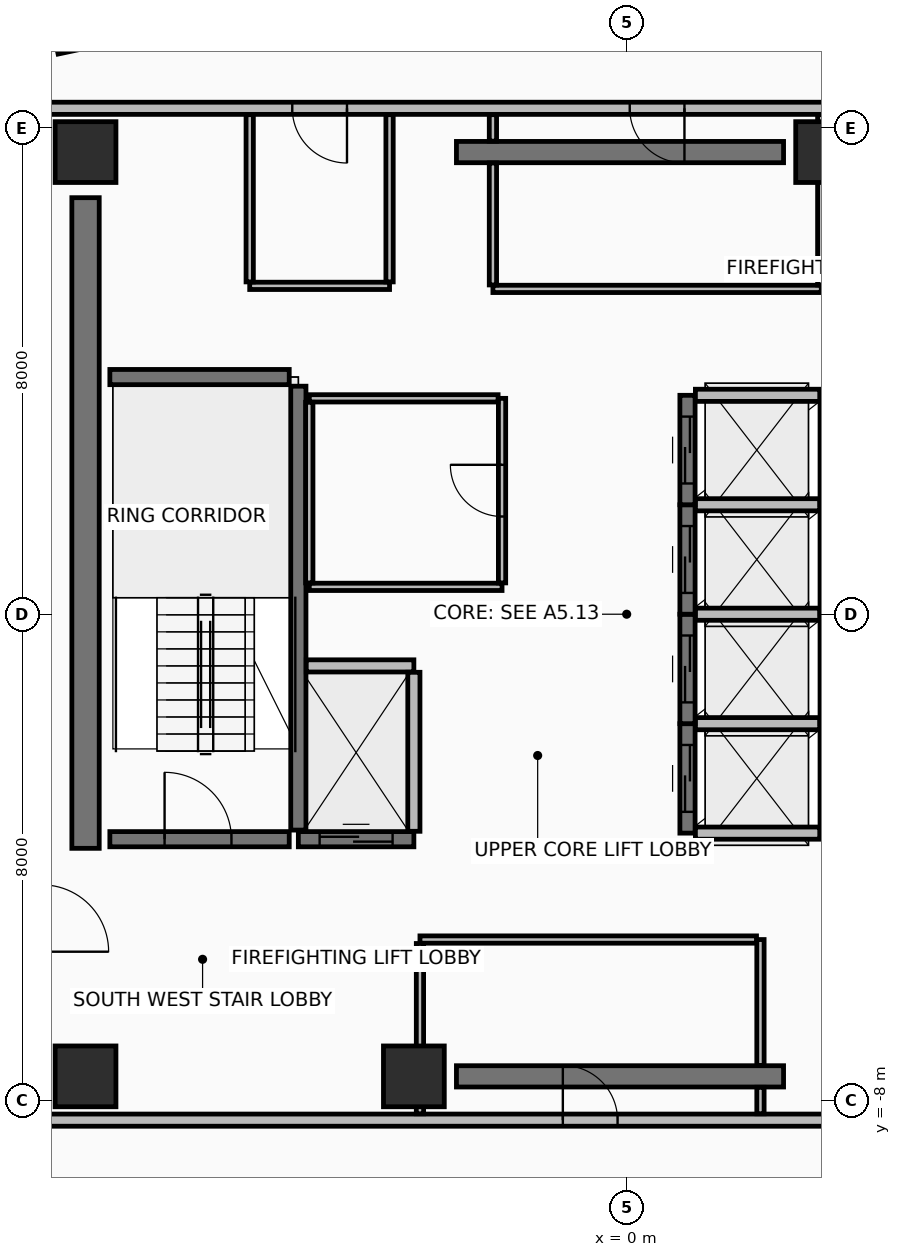
"""IFC4 building model, lengths in metres.
Left out: names, types, materials, properties, quantities, classifications, styles, units other than length and angle.
Written with IfcOpenShell. Run it as: python <this file> out.ifc"""

import sys

from ifc_helpers import new_model, si_unit, direction, frame, frame_2d, origin, origin_2d, place, context, subcontext, project, spatial, rectangle, hollow_rectangle, extrude, element, fill, save


model = new_model("IFC4")
c1 = context("Model", 3, precision=1e-05, world=origin(), true_north=direction((0.0, 1.0)))
c2 = subcontext(c1, "Body", "Model", "MODEL_VIEW")
j1 = project(units=[si_unit("LENGTHUNIT", "METRE"), si_unit("PLANEANGLEUNIT", "RADIAN")], contexts=[c1])
p1 = place(None, origin())
s1 = spatial("IfcSite", under=j1, at=p1, CompositionType="ELEMENT")
p2 = place(p1, origin())
s2 = spatial("IfcBuilding", under=s1, at=p2, CompositionType="ELEMENT")
p3 = place(p2, frame((0.0, 0.0, 290.7)))
s3 = spatial("IfcBuildingStorey", under=s2, at=p3, CompositionType="ELEMENT", Elevation=290.7)
for number, where, z_axis, x_axis in (
    (1, (-8.9, -7.6, 0.0), (0.0, 0.0, 1.0), (1.0, 0.0, 0.0)),
    (2, (-3.5, -7.6, 0.0), (0.0, 0.0, 1.0), (1.0, 0.0, 0.0)),
    (3, (3.28, 7.6, 0.0), (0.0, 0.0, 1.0), (1.0, 0.0, 0.0)),
    (4, (-8.9, 7.6, 0.0), (0.0, 0.0, 1.0), (1.0, 0.0, 0.0)),
):
    element("IfcColumn", number, at=place(p3, frame(where, z_axis=z_axis, x_axis=x_axis)), inside=s3, PredefinedType="COLUMN", context=c2, shape_type="SweptSolid", body=[
        extrude(rectangle(XDim=1.0, YDim=1.0, at=origin_2d()), origin(), (0.0, 0.0, 1.0), 3.65),
    ])
p4 = place(p3, frame((-9.197, 9.449, 0.0), z_axis=(0.0, 0.0, 1.0), x_axis=(0.978147237858, 0.207913398007, 0.0)))
e5 = element("IfcColumn", 5, at=p4, inside=s3, PredefinedType="COLUMN", context=c2, shape_type="SweptSolid", body=[
    extrude(hollow_rectangle(XDim=0.4, YDim=0.4, WallThickness=0.025, at=origin_2d()), origin(), (0.0, 0.0, 1.0), 3.65),
])
for number, where, z_axis, x_axis in (
    (6, (-2.8, -7.6, 0.0), (0.0, 0.0, 1.0), (1.0, 0.0, 0.0)),
    (7, (-2.8, 7.6, 0.0), (0.0, 0.0, 1.0), (1.0, 0.0, 0.0)),
):
    element("IfcWall", number, at=place(p3, frame(where, z_axis=z_axis, x_axis=x_axis)), inside=s3, PredefinedType="SHEAR", context=c2, shape_type="SweptSolid", body=[
        extrude(rectangle(XDim=5.38, YDim=0.35, at=frame_2d((2.69, 0.0))), origin(), (0.0, 0.0, 1.0), 3.465),
    ])
p5 = place(p3, frame((-8.9, -3.85, 0.0), z_axis=(0.0, 0.0, 1.0), x_axis=(0.0, 1.0, 0.0)))
e8 = element("IfcWall", 8, at=p5, inside=s3, PredefinedType="SHEAR", context=c2, shape_type="SweptSolid", body=[
    extrude(rectangle(XDim=10.7, YDim=0.45, at=frame_2d((5.35, 0.0))), origin(), (0.0, 0.0, 1.0), 3.465),
])
p6 = place(p3, frame((-9.62, -8.32, 0.0), z_axis=(0.0, 0.0, 1.0), x_axis=(1.0, 0.0, 0.0)))
e9 = element("IfcWall", 9, at=p6, inside=s3, PredefinedType="PARTITIONING", context=c2, shape_type="SweptSolid", body=[
    extrude(rectangle(XDim=19.24, YDim=0.2, at=frame_2d((9.62, 0.0))), origin(), (0.0, 0.0, 1.0), 2.96),
])
p7 = place(p6, frame((8.57, 0.0, 0.0)))
e10 = element("IfcOpeningElement", 10, at=p7, cuts=e9, PredefinedType="OPENING", context=c2, shape_type="SweptSolid", body=[
    extrude(rectangle(XDim=0.9, YDim=2.1, at=frame_2d((0.45, 1.05))), frame((0.0, 0.11, 0.0), z_axis=(0.0, -1.0, 0.0), x_axis=(1.0, 0.0, 0.0)), (0.0, 0.0, 1.0), 0.22),
])
p8 = place(p6, frame((15.02, 0.0, 0.0)))
e11 = element("IfcOpeningElement", 11, at=p8, cuts=e9, PredefinedType="OPENING", context=c2, shape_type="SweptSolid", body=[
    extrude(rectangle(XDim=0.9, YDim=2.1, at=frame_2d((0.45, 1.05))), frame((0.0, 0.11, 0.0), z_axis=(0.0, -1.0, 0.0), x_axis=(1.0, 0.0, 0.0)), (0.0, 0.0, 1.0), 0.22),
])
p9 = place(p3, frame((9.62, 8.32, 0.0), z_axis=(0.0, 0.0, 1.0), x_axis=(-1.0, 0.0, 0.0)))
e12 = element("IfcWall", 12, at=p9, inside=s3, PredefinedType="PARTITIONING", context=c2, shape_type="SweptSolid", body=[
    extrude(rectangle(XDim=19.24, YDim=0.2, at=frame_2d((9.62, 0.0))), origin(), (0.0, 0.0, 1.0), 2.96),
])
p10 = place(p9, frame((8.67, 0.0, 0.0)))
e13 = element("IfcOpeningElement", 13, at=p10, cuts=e12, PredefinedType="OPENING", context=c2, shape_type="SweptSolid", body=[
    extrude(rectangle(XDim=0.9, YDim=2.1, at=frame_2d((0.45, 1.05))), frame((0.0, 0.11, 0.0), z_axis=(0.0, -1.0, 0.0), x_axis=(1.0, 0.0, 0.0)), (0.0, 0.0, 1.0), 0.22),
])
p11 = place(p9, frame((14.22, 0.0, 0.0)))
e14 = element("IfcOpeningElement", 14, at=p11, cuts=e12, PredefinedType="OPENING", context=c2, shape_type="SweptSolid", body=[
    extrude(rectangle(XDim=0.9, YDim=2.1, at=frame_2d((0.45, 1.05))), frame((0.0, 0.11, 0.0), z_axis=(0.0, -1.0, 0.0), x_axis=(1.0, 0.0, 0.0)), (0.0, 0.0, 1.0), 0.22),
])
p12 = place(p3, frame((-5.4, -3.55, 0.0), z_axis=(0.0, 0.0, 1.0), x_axis=(0.0, 1.0, 0.0)))
e15 = element("IfcWall", 15, at=p12, inside=s3, PredefinedType="SHEAR", context=c2, shape_type="SweptSolid", body=[
    extrude(rectangle(XDim=7.3, YDim=0.25, at=frame_2d((3.65, 0.0))), origin(), (0.0, 0.0, 1.0), 3.465),
])
p13 = place(p3, frame((-8.5, -3.7, 0.0), z_axis=(0.0, 0.0, 1.0), x_axis=(1.0, 0.0, 0.0)))
e16 = element("IfcWall", 16, at=p13, inside=s3, PredefinedType="SHEAR", context=c2, shape_type="SweptSolid", body=[
    extrude(rectangle(XDim=2.95, YDim=0.25, at=frame_2d((1.475, 0.0))), origin(), (0.0, 0.0, 1.0), 3.465),
])
p14 = place(p13, frame((0.9, 0.0, 0.0)))
e17 = element("IfcOpeningElement", 17, at=p14, cuts=e16, PredefinedType="OPENING", context=c2, shape_type="SweptSolid", body=[
    extrude(rectangle(XDim=1.1, YDim=2.15, at=frame_2d((0.55, 1.075))), frame((0.0, 0.135, 0.0), z_axis=(0.0, -1.0, 0.0), x_axis=(1.0, 0.0, 0.0)), (0.0, 0.0, 1.0), 0.27),
])
p15 = place(p3, frame((-8.5, 3.9, 0.0), z_axis=(0.0, 0.0, 1.0), x_axis=(1.0, 0.0, 0.0)))
e18 = element("IfcWall", 18, at=p15, inside=s3, PredefinedType="SHEAR", context=c2, shape_type="SweptSolid", body=[
    extrude(rectangle(XDim=2.95, YDim=0.25, at=frame_2d((1.475, 0.0))), origin(), (0.0, 0.0, 1.0), 3.465),
])
p16 = place(p3, frame((1.0, -3.6, 0.0), z_axis=(0.0, 0.0, 1.0), x_axis=(0.0, 1.0, 0.0)))
e19 = element("IfcWall", 19, at=p16, inside=s3, PredefinedType="SHEAR", context=c2, shape_type="SweptSolid", body=[
    extrude(rectangle(XDim=1.8, YDim=0.25, at=frame_2d((0.9, 0.0))), origin(), (0.0, 0.0, 1.0), 3.465),
])
p17 = place(p16, frame((0.35, 0.0, 0.0)))
e20 = element("IfcOpeningElement", 20, at=p17, cuts=e19, PredefinedType="OPENING", context=c2, shape_type="SweptSolid", body=[
    extrude(rectangle(XDim=1.1, YDim=2.2, at=frame_2d((0.55, 1.1))), frame((0.0, 0.135, 0.0), z_axis=(0.0, -1.0, 0.0), x_axis=(1.0, 0.0, 0.0)), (0.0, 0.0, 1.0), 0.27),
])
p18 = place(p3, frame((3.28, -3.6, 0.0), z_axis=(0.0, 0.0, 1.0), x_axis=(0.0, 1.0, 0.0)))
e21 = element("IfcWall", 21, at=p18, inside=s3, PredefinedType="PARTITIONING", context=c2, shape_type="SweptSolid", body=[
    extrude(rectangle(XDim=1.8, YDim=0.2, at=frame_2d((0.9, 0.0))), origin(), (0.0, 0.0, 1.0), 3.465),
])
for number, where, z_axis, x_axis in (
    (22, (1.13, -3.6, 0.0), (0.0, 0.0, 1.0), (1.0, 0.0, 0.0)),
    (23, (1.13, -1.8, 0.0), (0.0, 0.0, 1.0), (1.0, 0.0, 0.0)),
):
    element("IfcWall", number, at=place(p3, frame(where, z_axis=z_axis, x_axis=x_axis)), inside=s3, PredefinedType="PARTITIONING", context=c2, shape_type="SweptSolid", body=[
        extrude(rectangle(XDim=2.045, YDim=0.2, at=frame_2d((1.022, 0.0))), origin(), (0.0, 0.0, 1.0), 3.465),
    ])
p19 = place(p3, frame((1.0, -1.8, 0.0), z_axis=(0.0, 0.0, 1.0), x_axis=(0.0, 1.0, 0.0)))
e24 = element("IfcWall", 24, at=p19, inside=s3, PredefinedType="SHEAR", context=c2, shape_type="SweptSolid", body=[
    extrude(rectangle(XDim=1.8, YDim=0.25, at=frame_2d((0.9, 0.0))), origin(), (0.0, 0.0, 1.0), 3.465),
])
p20 = place(p19, frame((0.35, 0.0, 0.0)))
e25 = element("IfcOpeningElement", 25, at=p20, cuts=e24, PredefinedType="OPENING", context=c2, shape_type="SweptSolid", body=[
    extrude(rectangle(XDim=1.1, YDim=2.2, at=frame_2d((0.55, 1.1))), frame((0.0, 0.135, 0.0), z_axis=(0.0, -1.0, 0.0), x_axis=(1.0, 0.0, 0.0)), (0.0, 0.0, 1.0), 0.27),
])
p21 = place(p3, frame((3.28, -1.8, 0.0), z_axis=(0.0, 0.0, 1.0), x_axis=(0.0, 1.0, 0.0)))
e26 = element("IfcWall", 26, at=p21, inside=s3, PredefinedType="PARTITIONING", context=c2, shape_type="SweptSolid", body=[
    extrude(rectangle(XDim=1.8, YDim=0.2, at=frame_2d((0.9, 0.0))), origin(), (0.0, 0.0, 1.0), 3.465),
])
p22 = place(p3, frame((1.13, 0.0, 0.0), z_axis=(0.0, 0.0, 1.0), x_axis=(1.0, 0.0, 0.0)))
e27 = element("IfcWall", 27, at=p22, inside=s3, PredefinedType="PARTITIONING", context=c2, shape_type="SweptSolid", body=[
    extrude(rectangle(XDim=2.045, YDim=0.2, at=frame_2d((1.022, 0.0))), origin(), (0.0, 0.0, 1.0), 3.465),
])
p23 = place(p3, frame((1.0, 0.0, 0.0), z_axis=(0.0, 0.0, 1.0), x_axis=(0.0, 1.0, 0.0)))
e28 = element("IfcWall", 28, at=p23, inside=s3, PredefinedType="SHEAR", context=c2, shape_type="SweptSolid", body=[
    extrude(rectangle(XDim=1.8, YDim=0.25, at=frame_2d((0.9, 0.0))), origin(), (0.0, 0.0, 1.0), 3.465),
])
p24 = place(p23, frame((0.35, 0.0, 0.0)))
e29 = element("IfcOpeningElement", 29, at=p24, cuts=e28, PredefinedType="OPENING", context=c2, shape_type="SweptSolid", body=[
    extrude(rectangle(XDim=1.1, YDim=2.2, at=frame_2d((0.55, 1.1))), frame((0.0, 0.135, 0.0), z_axis=(0.0, -1.0, 0.0), x_axis=(1.0, 0.0, 0.0)), (0.0, 0.0, 1.0), 0.27),
])
p25 = place(p3, frame((3.28, 0.0, 0.0), z_axis=(0.0, 0.0, 1.0), x_axis=(0.0, 1.0, 0.0)))
e30 = element("IfcWall", 30, at=p25, inside=s3, PredefinedType="PARTITIONING", context=c2, shape_type="SweptSolid", body=[
    extrude(rectangle(XDim=1.8, YDim=0.2, at=frame_2d((0.9, 0.0))), origin(), (0.0, 0.0, 1.0), 3.465),
])
p26 = place(p3, frame((1.13, 1.8, 0.0), z_axis=(0.0, 0.0, 1.0), x_axis=(1.0, 0.0, 0.0)))
e31 = element("IfcWall", 31, at=p26, inside=s3, PredefinedType="PARTITIONING", context=c2, shape_type="SweptSolid", body=[
    extrude(rectangle(XDim=2.045, YDim=0.2, at=frame_2d((1.022, 0.0))), origin(), (0.0, 0.0, 1.0), 3.465),
])
p27 = place(p3, frame((1.0, 1.8, 0.0), z_axis=(0.0, 0.0, 1.0), x_axis=(0.0, 1.0, 0.0)))
e32 = element("IfcWall", 32, at=p27, inside=s3, PredefinedType="SHEAR", context=c2, shape_type="SweptSolid", body=[
    extrude(rectangle(XDim=1.8, YDim=0.25, at=frame_2d((0.9, 0.0))), origin(), (0.0, 0.0, 1.0), 3.465),
])
p28 = place(p27, frame((0.35, 0.0, 0.0)))
e33 = element("IfcOpeningElement", 33, at=p28, cuts=e32, PredefinedType="OPENING", context=c2, shape_type="SweptSolid", body=[
    extrude(rectangle(XDim=1.1, YDim=2.2, at=frame_2d((0.55, 1.1))), frame((0.0, 0.135, 0.0), z_axis=(0.0, -1.0, 0.0), x_axis=(1.0, 0.0, 0.0)), (0.0, 0.0, 1.0), 0.27),
])
p29 = place(p3, frame((3.28, 1.8, 0.0), z_axis=(0.0, 0.0, 1.0), x_axis=(0.0, 1.0, 0.0)))
e34 = element("IfcWall", 34, at=p29, inside=s3, PredefinedType="PARTITIONING", context=c2, shape_type="SweptSolid", body=[
    extrude(rectangle(XDim=1.8, YDim=0.2, at=frame_2d((0.9, 0.0))), origin(), (0.0, 0.0, 1.0), 3.465),
])
p30 = place(p3, frame((1.13, 3.6, 0.0), z_axis=(0.0, 0.0, 1.0), x_axis=(1.0, 0.0, 0.0)))
e35 = element("IfcWall", 35, at=p30, inside=s3, PredefinedType="PARTITIONING", context=c2, shape_type="SweptSolid", body=[
    extrude(rectangle(XDim=2.045, YDim=0.2, at=frame_2d((1.022, 0.0))), origin(), (0.0, 0.0, 1.0), 2.76),
])
p31 = place(p3, frame((-5.4, -3.7, 0.0), z_axis=(0.0, 0.0, 1.0), x_axis=(1.0, 0.0, 0.0)))
e36 = element("IfcWall", 36, at=p31, inside=s3, PredefinedType="SHEAR", context=c2, shape_type="SweptSolid", body=[
    extrude(rectangle(XDim=1.9, YDim=0.25, at=frame_2d((0.95, 0.0))), origin(), (0.0, 0.0, 1.0), 3.465),
])
p32 = place(p31, frame((0.35, 0.0, 0.0)))
e37 = element("IfcOpeningElement", 37, at=p32, cuts=e36, PredefinedType="OPENING", context=c2, shape_type="SweptSolid", body=[
    extrude(rectangle(XDim=1.2, YDim=2.2, at=frame_2d((0.6, 1.1))), frame((0.0, 0.135, 0.0), z_axis=(0.0, -1.0, 0.0), x_axis=(1.0, 0.0, 0.0)), (0.0, 0.0, 1.0), 0.27),
])
p33 = place(p3, frame((-5.27, -0.85, 0.0), z_axis=(0.0, 0.0, 1.0), x_axis=(1.0, 0.0, 0.0)))
e38 = element("IfcWall", 38, at=p33, inside=s3, PredefinedType="PARTITIONING", context=c2, shape_type="SweptSolid", body=[
    extrude(rectangle(XDim=1.77, YDim=0.2, at=frame_2d((0.885, 0.0))), origin(), (0.0, 0.0, 1.0), 3.465),
])
p34 = place(p3, frame((-3.5, -3.57, 0.0), z_axis=(0.0, 0.0, 1.0), x_axis=(0.0, 1.0, 0.0)))
e39 = element("IfcWall", 39, at=p34, inside=s3, PredefinedType="PARTITIONING", context=c2, shape_type="SweptSolid", body=[
    extrude(rectangle(XDim=2.615, YDim=0.2, at=frame_2d((1.308, 0.0))), origin(), (0.0, 0.0, 1.0), 3.465),
])
p35 = place(p3, frame((-5.22, 0.45, 0.0), z_axis=(0.0, 0.0, 1.0), x_axis=(1.0, 0.0, 0.0)))
e40 = element("IfcWall", 40, at=p35, inside=s3, PredefinedType="PARTITIONING", context=c2, shape_type="SweptSolid", body=[
    extrude(rectangle(XDim=3.17, YDim=0.12, at=frame_2d((1.585, 0.0))), origin(), (0.0, 0.0, 1.0), 3.465),
])
p36 = place(p3, frame((-2.05, 0.515, 0.0), z_axis=(0.0, 0.0, 1.0), x_axis=(0.0, 1.0, 0.0)))
e41 = element("IfcWall", 41, at=p36, inside=s3, PredefinedType="PARTITIONING", context=c2, shape_type="SweptSolid", body=[
    extrude(rectangle(XDim=3.035, YDim=0.12, at=frame_2d((1.518, 0.0))), origin(), (0.0, 0.0, 1.0), 3.465),
])
p37 = place(p36, frame((1.092, 0.0, 0.0)))
e42 = element("IfcOpeningElement", 42, at=p37, cuts=e41, PredefinedType="OPENING", context=c2, shape_type="SweptSolid", body=[
    extrude(rectangle(XDim=0.85, YDim=2.1, at=frame_2d((0.425, 1.05))), frame((0.0, 0.07, 0.0), z_axis=(0.0, -1.0, 0.0), x_axis=(1.0, 0.0, 0.0)), (0.0, 0.0, 1.0), 0.14),
])
p38 = place(p3, frame((-2.115, 3.55, 0.0), z_axis=(0.0, 0.0, 1.0), x_axis=(-1.0, 0.0, 0.0)))
e43 = element("IfcWall", 43, at=p38, inside=s3, PredefinedType="PARTITIONING", context=c2, shape_type="SweptSolid", body=[
    extrude(rectangle(XDim=3.105, YDim=0.12, at=frame_2d((1.552, 0.0))), origin(), (0.0, 0.0, 1.0), 3.465),
])
p39 = place(p3, frame((-5.22, 3.485, 0.0), z_axis=(0.0, 0.0, 1.0), x_axis=(0.0, -1.0, 0.0)))
e44 = element("IfcWall", 44, at=p39, inside=s3, PredefinedType="PARTITIONING", context=c2, shape_type="SweptSolid", body=[
    extrude(rectangle(XDim=2.97, YDim=0.12, at=frame_2d((1.485, 0.0))), origin(), (0.0, 0.0, 1.0), 3.465),
])
p40 = place(p3, frame((2.2, -8.215, 0.0), z_axis=(0.0, 0.0, 1.0), x_axis=(0.0, 1.0, 0.0)))
e45 = element("IfcWall", 45, at=p40, inside=s3, PredefinedType="PARTITIONING", context=c2, shape_type="SweptSolid", body=[
    extrude(rectangle(XDim=0.435, YDim=0.12, at=frame_2d((0.218, 0.0))), origin(), (0.0, 0.0, 1.0), 2.76),
])
p41 = place(p3, frame((2.2, -7.42, 0.0), z_axis=(0.0, 0.0, 1.0), x_axis=(0.0, 1.0, 0.0)))
e46 = element("IfcWall", 46, at=p41, inside=s3, PredefinedType="PARTITIONING", context=c2, shape_type="SweptSolid", body=[
    extrude(rectangle(XDim=2.07, YDim=0.12, at=frame_2d((1.035, 0.0))), origin(), (0.0, 0.0, 1.0), 2.76),
])
p42 = place(p3, frame((2.135, -5.35, 0.0), z_axis=(0.0, 0.0, 1.0), x_axis=(-1.0, 0.0, 0.0)))
e47 = element("IfcWall", 47, at=p42, inside=s3, PredefinedType="PARTITIONING", context=c2, shape_type="SweptSolid", body=[
    extrude(rectangle(XDim=5.535, YDim=0.12, at=frame_2d((2.768, 0.0))), origin(), (0.0, 0.0, 1.0), 2.76),
])
p43 = place(p3, frame((-3.4, -5.415, 0.0), z_axis=(0.0, 0.0, 1.0), x_axis=(0.0, -1.0, 0.0)))
e48 = element("IfcWall", 48, at=p43, inside=s3, PredefinedType="PARTITIONING", context=c2, shape_type="SweptSolid", body=[
    extrude(rectangle(XDim=2.8, YDim=0.12, at=frame_2d((1.4, 0.0))), origin(), (0.0, 0.0, 1.0), 2.76),
])
p44 = place(p3, frame((-2.2, 5.35, 0.0), z_axis=(0.0, 0.0, 1.0), x_axis=(1.0, 0.0, 0.0)))
e49 = element("IfcWall", 49, at=p44, inside=s3, PredefinedType="PARTITIONING", context=c2, shape_type="SweptSolid", body=[
    extrude(rectangle(XDim=5.4, YDim=0.12, at=frame_2d((2.7, 0.0))), origin(), (0.0, 0.0, 1.0), 2.76),
])
p45 = place(p3, frame((3.2, 5.415, 0.0), z_axis=(0.0, 0.0, 1.0), x_axis=(0.0, 1.0, 0.0)))
e50 = element("IfcWall", 50, at=p45, inside=s3, PredefinedType="PARTITIONING", context=c2, shape_type="SweptSolid", body=[
    extrude(rectangle(XDim=2.8, YDim=0.12, at=frame_2d((1.4, 0.0))), origin(), (0.0, 0.0, 1.0), 2.76),
])
p46 = place(p3, frame((-2.2, 8.215, 0.0), z_axis=(0.0, 0.0, 1.0), x_axis=(0.0, -1.0, 0.0)))
e51 = element("IfcWall", 51, at=p46, inside=s3, PredefinedType="PARTITIONING", context=c2, shape_type="SweptSolid", body=[
    extrude(rectangle(XDim=0.435, YDim=0.12, at=frame_2d((0.218, 0.0))), origin(), (0.0, 0.0, 1.0), 2.76),
])
p47 = place(p3, frame((-2.2, 7.42, 0.0), z_axis=(0.0, 0.0, 1.0), x_axis=(0.0, -1.0, 0.0)))
e52 = element("IfcWall", 52, at=p47, inside=s3, PredefinedType="PARTITIONING", context=c2, shape_type="SweptSolid", body=[
    extrude(rectangle(XDim=2.005, YDim=0.12, at=frame_2d((1.002, 0.0))), origin(), (0.0, 0.0, 1.0), 2.76),
])
p48 = place(p3, frame((-6.2, 5.4, 0.0), z_axis=(0.0, 0.0, 1.0), x_axis=(1.0, 0.0, 0.0)))
e53 = element("IfcWall", 53, at=p48, inside=s3, PredefinedType="PARTITIONING", context=c2, shape_type="SweptSolid", body=[
    extrude(rectangle(XDim=2.3, YDim=0.12, at=frame_2d((1.15, 0.0))), origin(), (0.0, 0.0, 1.0), 3.465),
])
for number, where, z_axis, x_axis in (
    (54, (-3.9, 5.465, 0.0), (0.0, 0.0, 1.0), (0.0, 1.0, 0.0)),
    (55, (-6.2, 8.215, 0.0), (0.0, 0.0, 1.0), (0.0, -1.0, 0.0)),
):
    element("IfcWall", number, at=place(p3, frame(where, z_axis=z_axis, x_axis=x_axis)), inside=s3, PredefinedType="PARTITIONING", context=c2, shape_type="SweptSolid", body=[
        extrude(rectangle(XDim=2.75, YDim=0.12, at=frame_2d((1.375, 0.0))), origin(), (0.0, 0.0, 1.0), 2.76),
    ])
p49 = place(p14, origin())
e56 = element("IfcDoor", 56, at=p49, inside=s3, OperationType="SINGLE_SWING_LEFT", PredefinedType="DOOR", context=c2, shape_type="SweptSolid", body=[
    extrude(rectangle(XDim=1.1, YDim=2.15, at=frame_2d((0.55, 1.075))), frame((0.0, 0.025, 0.0), z_axis=(0.0, -1.0, 0.0), x_axis=(1.0, 0.0, 0.0)), (0.0, 0.0, 1.0), 0.05),
])
fill(e17, e56)
p50 = place(p17, origin())
e57 = element("IfcDoor", 57, at=p50, inside=s3, OperationType="SLIDING_TO_LEFT", PredefinedType="DOOR", context=c2, shape_type="SweptSolid", body=[
    extrude(rectangle(XDim=1.1, YDim=2.2, at=frame_2d((0.55, 1.1))), frame((0.0, 0.025, 0.0), z_axis=(0.0, -1.0, 0.0), x_axis=(1.0, 0.0, 0.0)), (0.0, 0.0, 1.0), 0.05),
])
fill(e20, e57)
p51 = place(p20, origin())
e58 = element("IfcDoor", 58, at=p51, inside=s3, OperationType="SLIDING_TO_LEFT", PredefinedType="DOOR", context=c2, shape_type="SweptSolid", body=[
    extrude(rectangle(XDim=1.1, YDim=2.2, at=frame_2d((0.55, 1.1))), frame((0.0, 0.025, 0.0), z_axis=(0.0, -1.0, 0.0), x_axis=(1.0, 0.0, 0.0)), (0.0, 0.0, 1.0), 0.05),
])
fill(e25, e58)
p52 = place(p24, origin())
e59 = element("IfcDoor", 59, at=p52, inside=s3, OperationType="SLIDING_TO_LEFT", PredefinedType="DOOR", context=c2, shape_type="SweptSolid", body=[
    extrude(rectangle(XDim=1.1, YDim=2.2, at=frame_2d((0.55, 1.1))), frame((0.0, 0.025, 0.0), z_axis=(0.0, -1.0, 0.0), x_axis=(1.0, 0.0, 0.0)), (0.0, 0.0, 1.0), 0.05),
])
fill(e29, e59)
p53 = place(p28, origin())
e60 = element("IfcDoor", 60, at=p53, inside=s3, OperationType="SLIDING_TO_LEFT", PredefinedType="DOOR", context=c2, shape_type="SweptSolid", body=[
    extrude(rectangle(XDim=1.1, YDim=2.2, at=frame_2d((0.55, 1.1))), frame((0.0, 0.025, 0.0), z_axis=(0.0, -1.0, 0.0), x_axis=(1.0, 0.0, 0.0)), (0.0, 0.0, 1.0), 0.05),
])
fill(e33, e60)
p54 = place(p32, origin())
e61 = element("IfcDoor", 61, at=p54, inside=s3, OperationType="SLIDING_TO_RIGHT", PredefinedType="DOOR", context=c2, shape_type="SweptSolid", body=[
    extrude(rectangle(XDim=1.2, YDim=2.2, at=frame_2d((0.6, 1.1))), frame((0.0, 0.025, 0.0), z_axis=(0.0, -1.0, 0.0), x_axis=(1.0, 0.0, 0.0)), (0.0, 0.0, 1.0), 0.05),
])
fill(e37, e61)
p55 = place(p37, frame((0.85, 0.0, 0.0), z_axis=(0.0, 0.0, 1.0), x_axis=(-1.0, 0.0, 0.0)))
e62 = element("IfcDoor", 62, at=p55, inside=s3, OperationType="SINGLE_SWING_RIGHT", PredefinedType="DOOR", context=c2, shape_type="SweptSolid", body=[
    extrude(rectangle(XDim=0.85, YDim=2.1, at=frame_2d((0.425, 1.05))), frame((0.0, 0.025, 0.0), z_axis=(0.0, -1.0, 0.0), x_axis=(1.0, 0.0, 0.0)), (0.0, 0.0, 1.0), 0.05),
])
fill(e42, e62)
p56 = place(p7, origin())
e63 = element("IfcDoor", 63, at=p56, inside=s3, OperationType="SINGLE_SWING_LEFT", PredefinedType="DOOR", context=c2, shape_type="SweptSolid", body=[
    extrude(rectangle(XDim=0.9, YDim=2.1, at=frame_2d((0.45, 1.05))), frame((0.0, 0.025, 0.0), z_axis=(0.0, -1.0, 0.0), x_axis=(1.0, 0.0, 0.0)), (0.0, 0.0, 1.0), 0.05),
])
fill(e10, e63)
p57 = place(p10, origin())
e64 = element("IfcDoor", 64, at=p57, inside=s3, OperationType="SINGLE_SWING_LEFT", PredefinedType="DOOR", context=c2, shape_type="SweptSolid", body=[
    extrude(rectangle(XDim=0.9, YDim=2.1, at=frame_2d((0.45, 1.05))), frame((0.0, 0.025, 0.0), z_axis=(0.0, -1.0, 0.0), x_axis=(1.0, 0.0, 0.0)), (0.0, 0.0, 1.0), 0.05),
])
fill(e13, e64)
p58 = place(p11, origin())
e65 = element("IfcDoor", 65, at=p58, inside=s3, OperationType="SINGLE_SWING_LEFT", PredefinedType="DOOR", context=c2, shape_type="SweptSolid", body=[
    extrude(rectangle(XDim=0.9, YDim=2.1, at=frame_2d((0.45, 1.05))), frame((0.0, 0.025, 0.0), z_axis=(0.0, -1.0, 0.0), x_axis=(1.0, 0.0, 0.0)), (0.0, 0.0, 1.0), 0.05),
])
fill(e14, e65)
save(model, sys.argv[1])
